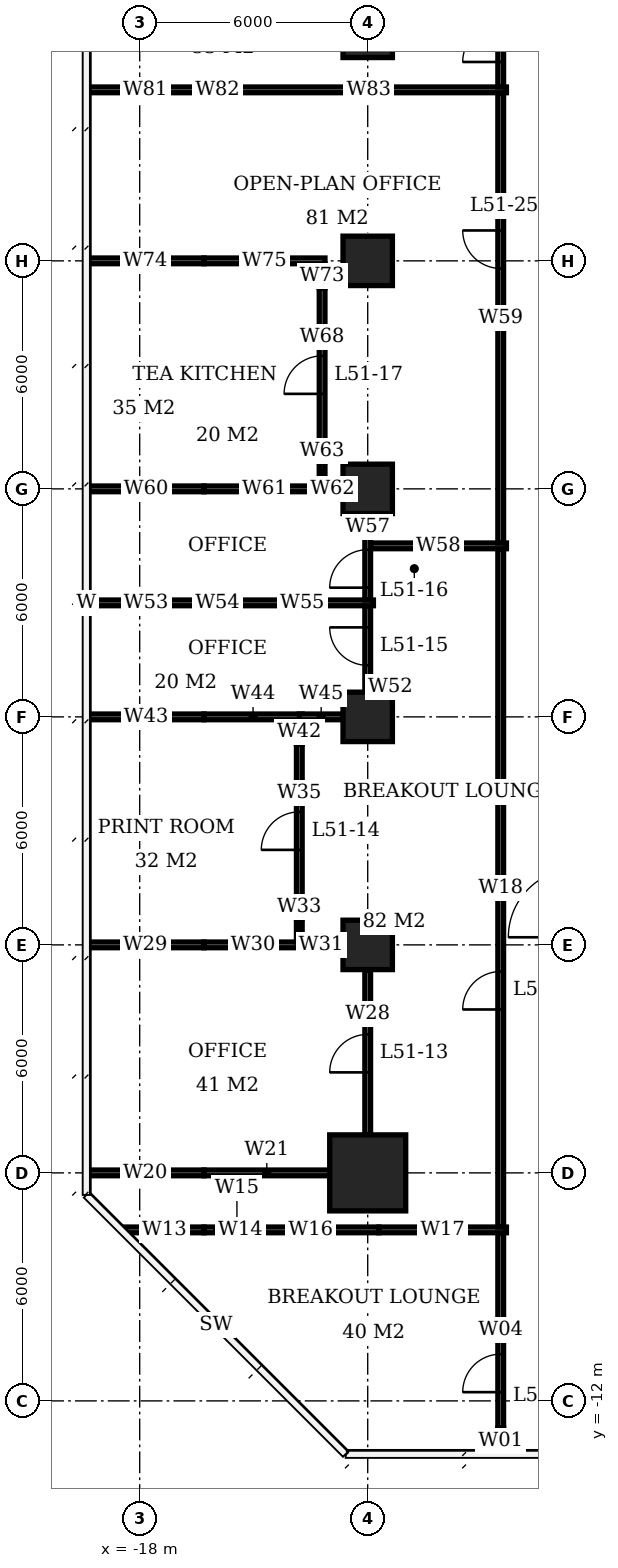
"""IFC4 building model, lengths in metres.
Left out: names, types, materials, properties, quantities, classifications, styles, units other than length and angle.
Written with IfcOpenShell. Run it as: python <this file> out.ifc"""

import sys

from ifc_helpers import new_model, si_unit, direction, frame, frame_2d, origin, origin_2d, place, context, subcontext, project, spatial, rectangle, extrude, element, fill, save


model = new_model("IFC4")
c1 = context("Model", 3, precision=1e-05, world=origin(), true_north=direction((0.0, 1.0)))
c2 = subcontext(c1, "Body", "Model", "MODEL_VIEW")
j1 = project(units=[si_unit("LENGTHUNIT", "METRE"), si_unit("PLANEANGLEUNIT", "RADIAN")], contexts=[c1])
p1 = place(None, origin())
s1 = spatial("IfcSite", under=j1, at=p1, CompositionType="ELEMENT")
p2 = place(p1, origin())
s2 = spatial("IfcBuilding", under=s1, at=p2, CompositionType="ELEMENT")
p3 = place(p2, frame((0.0, 0.0, 208.4)))
s3 = spatial("IfcBuildingStorey", under=s2, at=p3, CompositionType="ELEMENT", Elevation=208.4)
p4 = place(p3, frame((-12.0, -6.0, 0.0), z_axis=(0.0, 0.0, 1.0), x_axis=(1.0, 0.0, 0.0)))
e1 = element("IfcColumn", 1, at=p4, inside=s3, PredefinedType="COLUMN", context=c2, shape_type="SweptSolid", body=[
    extrude(rectangle(XDim=2.0, YDim=2.0, at=origin_2d()), origin(), (0.0, 0.0, 1.0), 3.9),
])
for number, where, z_axis, x_axis in (
    (2, (-12.0, 0.0, 0.0), (0.0, 0.0, 1.0), (1.0, 0.0, 0.0)),
    (3, (-12.0, 6.0, 0.0), (0.0, 0.0, 1.0), (1.0, 0.0, 0.0)),
    (4, (-12.0, 12.0, 0.0), (0.0, 0.0, 1.0), (1.0, 0.0, 0.0)),
    (5, (-12.0, 18.0, 0.0), (0.0, 0.0, 1.0), (1.0, 0.0, 0.0)),
    (6, (-12.0, 24.0, 0.0), (0.0, 0.0, 1.0), (1.0, 0.0, 0.0)),
):
    element("IfcColumn", number, at=place(p3, frame(where, z_axis=z_axis, x_axis=x_axis)), inside=s3, PredefinedType="COLUMN", context=c2, shape_type="SweptSolid", body=[
        extrude(rectangle(XDim=1.3, YDim=1.3, at=origin_2d()), origin(), (0.0, 0.0, 1.0), 3.9),
    ])
p5 = place(p3, frame((-19.4, -6.0, 0.0), z_axis=(0.0, 0.0, 1.0), x_axis=(1.0, 0.0, 0.0)))
e7 = element("IfcWall", 7, at=p5, inside=s3, PredefinedType="PARTITIONING", context=c2, shape_type="SweptSolid", body=[
    extrude(rectangle(XDim=3.09, YDim=0.15, at=frame_2d((1.545, 0.0))), origin(), (0.0, 0.0, 1.0), 3.65),
])
p6 = place(p3, frame((-16.31, -6.0, 0.0), z_axis=(0.0, 0.0, 1.0), x_axis=(1.0, 0.0, 0.0)))
e8 = element("IfcWall", 8, at=p6, inside=s3, PredefinedType="PARTITIONING", context=c2, shape_type="SweptSolid", body=[
    extrude(rectangle(XDim=3.31, YDim=0.15, at=frame_2d((1.655, 0.0))), origin(), (0.0, 0.0, 1.0), 2.65),
])
p7 = place(p3, frame((-19.4, 0.0, 0.0), z_axis=(0.0, 0.0, 1.0), x_axis=(1.0, 0.0, 0.0)))
e9 = element("IfcWall", 9, at=p7, inside=s3, PredefinedType="PARTITIONING", context=c2, shape_type="SweptSolid", body=[
    extrude(rectangle(XDim=3.09, YDim=0.15, at=frame_2d((1.545, 0.0))), origin(), (0.0, 0.0, 1.0), 3.65),
])
p8 = place(p3, frame((-16.31, 0.0, 0.0), z_axis=(0.0, 0.0, 1.0), x_axis=(1.0, 0.0, 0.0)))
e10 = element("IfcWall", 10, at=p8, inside=s3, PredefinedType="PARTITIONING", context=c2, shape_type="SweptSolid", body=[
    extrude(rectangle(XDim=2.585, YDim=0.15, at=frame_2d((1.292, 0.0))), origin(), (0.0, 0.0, 1.0), 2.65),
])
p9 = place(p3, frame((-13.8, 0.0, 0.0), z_axis=(0.0, 0.0, 1.0), x_axis=(1.0, 0.0, 0.0)))
e11 = element("IfcWall", 11, at=p9, inside=s3, PredefinedType="PARTITIONING", context=c2, shape_type="SweptSolid", body=[
    extrude(rectangle(XDim=1.15, YDim=0.15, at=frame_2d((0.575, 0.0))), origin(), (0.0, 0.0, 1.0), 2.65),
])
p10 = place(p3, frame((-19.35, 6.0, 0.0), z_axis=(0.0, 0.0, 1.0), x_axis=(1.0, 0.0, 0.0)))
e12 = element("IfcWall", 12, at=p10, inside=s3, PredefinedType="PARTITIONING", context=c2, shape_type="SweptSolid", body=[
    extrude(rectangle(XDim=3.04, YDim=0.15, at=frame_2d((1.52, 0.0))), origin(), (0.0, 0.0, 1.0), 3.65),
])
p11 = place(p3, frame((-16.31, 6.0, 0.0), z_axis=(0.0, 0.0, 1.0), x_axis=(1.0, 0.0, 0.0)))
e13 = element("IfcWall", 13, at=p11, inside=s3, PredefinedType="PARTITIONING", context=c2, shape_type="SweptSolid", body=[
    extrude(rectangle(XDim=2.585, YDim=0.15, at=frame_2d((1.292, 0.0))), origin(), (0.0, 0.0, 1.0), 2.65),
])
p12 = place(p3, frame((-13.8, 6.0, 0.0), z_axis=(0.0, 0.0, 1.0), x_axis=(1.0, 0.0, 0.0)))
e14 = element("IfcWall", 14, at=p12, inside=s3, PredefinedType="PARTITIONING", context=c2, shape_type="SweptSolid", body=[
    extrude(rectangle(XDim=1.15, YDim=0.15, at=frame_2d((0.575, 0.0))), origin(), (0.0, 0.0, 1.0), 2.65),
])
p13 = place(p3, frame((-19.35, 9.0, 0.0), z_axis=(0.0, 0.0, 1.0), x_axis=(1.0, 0.0, 0.0)))
e15 = element("IfcWall", 15, at=p13, inside=s3, PredefinedType="PARTITIONING", context=c2, shape_type="SweptSolid", body=[
    extrude(rectangle(XDim=3.04, YDim=0.15, at=frame_2d((1.52, 0.0))), origin(), (0.0, 0.0, 1.0), 3.65),
])
p14 = place(p3, frame((-16.31, 9.0, 0.0), z_axis=(0.0, 0.0, 1.0), x_axis=(1.0, 0.0, 0.0)))
e16 = element("IfcWall", 16, at=p14, inside=s3, PredefinedType="PARTITIONING", context=c2, shape_type="SweptSolid", body=[
    extrude(rectangle(XDim=0.72, YDim=0.15, at=frame_2d((0.36, 0.0))), origin(), (0.0, 0.0, 1.0), 2.65),
])
p15 = place(p3, frame((-15.59, 9.0, 0.0), z_axis=(0.0, 0.0, 1.0), x_axis=(1.0, 0.0, 0.0)))
e17 = element("IfcWall", 17, at=p15, inside=s3, PredefinedType="PARTITIONING", context=c2, shape_type="SweptSolid", body=[
    extrude(rectangle(XDim=3.74, YDim=0.15, at=frame_2d((1.87, 0.0))), origin(), (0.0, 0.0, 1.0), 3.65),
])
p16 = place(p3, frame((-19.35, 12.0, 0.0), z_axis=(0.0, 0.0, 1.0), x_axis=(1.0, 0.0, 0.0)))
e18 = element("IfcWall", 18, at=p16, inside=s3, PredefinedType="PARTITIONING", context=c2, shape_type="SweptSolid", body=[
    extrude(rectangle(XDim=3.04, YDim=0.15, at=frame_2d((1.52, 0.0))), origin(), (0.0, 0.0, 1.0), 3.65),
])
p17 = place(p3, frame((-16.31, 12.0, 0.0), z_axis=(0.0, 0.0, 1.0), x_axis=(1.0, 0.0, 0.0)))
e19 = element("IfcWall", 19, at=p17, inside=s3, PredefinedType="PARTITIONING", context=c2, shape_type="SweptSolid", body=[
    extrude(rectangle(XDim=3.185, YDim=0.15, at=frame_2d((1.593, 0.0))), origin(), (0.0, 0.0, 1.0), 2.65),
])
p18 = place(p3, frame((-13.2, 12.0, 0.0), z_axis=(0.0, 0.0, 1.0), x_axis=(1.0, 0.0, 0.0)))
e20 = element("IfcWall", 20, at=p18, inside=s3, PredefinedType="PARTITIONING", context=c2, shape_type="SweptSolid", body=[
    extrude(rectangle(XDim=0.55, YDim=0.15, at=frame_2d((0.275, 0.0))), origin(), (0.0, 0.0, 1.0), 2.65),
])
p19 = place(p3, frame((-19.4, 18.0, 0.0), z_axis=(0.0, 0.0, 1.0), x_axis=(1.0, 0.0, 0.0)))
e21 = element("IfcWall", 21, at=p19, inside=s3, PredefinedType="PARTITIONING", context=c2, shape_type="SweptSolid", body=[
    extrude(rectangle(XDim=3.09, YDim=0.15, at=frame_2d((1.545, 0.0))), origin(), (0.0, 0.0, 1.0), 3.65),
])
p20 = place(p3, frame((-16.31, 18.0, 0.0), z_axis=(0.0, 0.0, 1.0), x_axis=(1.0, 0.0, 0.0)))
e22 = element("IfcWall", 22, at=p20, inside=s3, PredefinedType="PARTITIONING", context=c2, shape_type="SweptSolid", body=[
    extrude(rectangle(XDim=3.185, YDim=0.15, at=frame_2d((1.593, 0.0))), origin(), (0.0, 0.0, 1.0), 2.65),
])
p21 = place(p3, frame((-13.8, 0.075, 0.0), z_axis=(0.0, 0.0, 1.0), x_axis=(0.0, 1.0, 0.0)))
e23 = element("IfcWall", 23, at=p21, inside=s3, PredefinedType="PARTITIONING", context=c2, shape_type="SweptSolid", body=[
    extrude(rectangle(XDim=0.635, YDim=0.15, at=frame_2d((0.317, 0.0))), origin(), (0.0, 0.0, 1.0), 2.65),
])
p22 = place(p3, frame((-13.8, 0.71, 0.0), z_axis=(0.0, 0.0, 1.0), x_axis=(0.0, 1.0, 0.0)))
e24 = element("IfcWall", 24, at=p22, inside=s3, PredefinedType="PARTITIONING", context=c2, shape_type="SweptSolid", body=[
    extrude(rectangle(XDim=4.58, YDim=0.15, at=frame_2d((2.29, 0.0))), origin(), (0.0, 0.0, 1.0), 3.65),
])
p23 = place(p22, frame((1.79, 0.0, 0.0)))
e25 = element("IfcOpeningElement", 25, at=p23, cuts=e24, PredefinedType="OPENING", context=c2, shape_type="SweptSolid", body=[
    extrude(rectangle(XDim=1.0, YDim=2.1, at=frame_2d((0.5, 1.05))), frame((0.0, 0.085, 0.0), z_axis=(0.0, -1.0, 0.0), x_axis=(1.0, 0.0, 0.0)), (0.0, 0.0, 1.0), 0.17),
])
for number, where, z_axis, x_axis in (
    (26, (-13.8, 5.29, 0.0), (0.0, 0.0, 1.0), (0.0, 1.0, 0.0)),
    (27, (-13.2, 12.075, 0.0), (0.0, 0.0, 1.0), (0.0, 1.0, 0.0)),
):
    element("IfcWall", number, at=place(p3, frame(where, z_axis=z_axis, x_axis=x_axis)), inside=s3, PredefinedType="PARTITIONING", context=c2, shape_type="SweptSolid", body=[
        extrude(rectangle(XDim=0.635, YDim=0.15, at=frame_2d((0.317, 0.0))), origin(), (0.0, 0.0, 1.0), 2.65),
    ])
p24 = place(p3, frame((-13.2, 12.71, 0.0), z_axis=(0.0, 0.0, 1.0), x_axis=(0.0, 1.0, 0.0)))
e28 = element("IfcWall", 28, at=p24, inside=s3, PredefinedType="PARTITIONING", context=c2, shape_type="SweptSolid", body=[
    extrude(rectangle(XDim=4.58, YDim=0.15, at=frame_2d((2.29, 0.0))), origin(), (0.0, 0.0, 1.0), 3.65),
])
p25 = place(p24, frame((1.79, 0.0, 0.0)))
e29 = element("IfcOpeningElement", 29, at=p25, cuts=e28, PredefinedType="OPENING", context=c2, shape_type="SweptSolid", body=[
    extrude(rectangle(XDim=1.0, YDim=2.1, at=frame_2d((0.5, 1.05))), frame((0.0, 0.085, 0.0), z_axis=(0.0, -1.0, 0.0), x_axis=(1.0, 0.0, 0.0)), (0.0, 0.0, 1.0), 0.17),
])
p26 = place(p3, frame((-13.2, 17.29, 0.0), z_axis=(0.0, 0.0, 1.0), x_axis=(0.0, 1.0, 0.0)))
e30 = element("IfcWall", 30, at=p26, inside=s3, PredefinedType="PARTITIONING", context=c2, shape_type="SweptSolid", body=[
    extrude(rectangle(XDim=0.635, YDim=0.15, at=frame_2d((0.317, 0.0))), origin(), (0.0, 0.0, 1.0), 2.65),
])
p27 = place(p3, frame((-12.0, -5.0, 0.0), z_axis=(0.0, 0.0, 1.0), x_axis=(0.0, 1.0, 0.0)))
e31 = element("IfcWall", 31, at=p27, inside=s3, PredefinedType="PARTITIONING", context=c2, shape_type="SweptSolid", body=[
    extrude(rectangle(XDim=4.34, YDim=0.15, at=frame_2d((2.17, 0.0))), origin(), (0.0, 0.0, 1.0), 3.65),
])
p28 = place(p27, frame((1.645, 0.0, 0.0)))
e32 = element("IfcOpeningElement", 32, at=p28, cuts=e31, PredefinedType="OPENING", context=c2, shape_type="SweptSolid", body=[
    extrude(rectangle(XDim=1.0, YDim=2.1, at=frame_2d((0.5, 1.05))), frame((0.0, 0.085, 0.0), z_axis=(0.0, -1.0, 0.0), x_axis=(1.0, 0.0, 0.0)), (0.0, 0.0, 1.0), 0.17),
])
p29 = place(p3, frame((-12.0, 6.66, 0.0), z_axis=(0.0, 0.0, 1.0), x_axis=(0.0, 1.0, 0.0)))
e33 = element("IfcWall", 33, at=p29, inside=s3, PredefinedType="PARTITIONING", context=c2, shape_type="SweptSolid", body=[
    extrude(rectangle(XDim=2.265, YDim=0.15, at=frame_2d((1.133, 0.0))), origin(), (0.0, 0.0, 1.0), 3.65),
])
p30 = place(p29, frame((0.695, 0.0, 0.0)))
e34 = element("IfcOpeningElement", 34, at=p30, cuts=e33, PredefinedType="OPENING", context=c2, shape_type="SweptSolid", body=[
    extrude(rectangle(XDim=1.0, YDim=2.1, at=frame_2d((0.5, 1.05))), frame((0.0, 0.085, 0.0), z_axis=(0.0, -1.0, 0.0), x_axis=(1.0, 0.0, 0.0)), (0.0, 0.0, 1.0), 0.17),
])
p31 = place(p3, frame((-12.0, 9.075, 0.0), z_axis=(0.0, 0.0, 1.0), x_axis=(0.0, 1.0, 0.0)))
e35 = element("IfcWall", 35, at=p31, inside=s3, PredefinedType="PARTITIONING", context=c2, shape_type="SweptSolid", body=[
    extrude(rectangle(XDim=2.265, YDim=0.15, at=frame_2d((1.133, 0.0))), origin(), (0.0, 0.0, 1.0), 3.65),
])
p32 = place(p31, frame((0.325, 0.0, 0.0)))
e36 = element("IfcOpeningElement", 36, at=p32, cuts=e35, PredefinedType="OPENING", context=c2, shape_type="SweptSolid", body=[
    extrude(rectangle(XDim=1.0, YDim=2.1, at=frame_2d((0.5, 1.05))), frame((0.0, 0.085, 0.0), z_axis=(0.0, -1.0, 0.0), x_axis=(1.0, 0.0, 0.0)), (0.0, 0.0, 1.0), 0.17),
])
p33 = place(p3, frame((-19.4, 22.5, 0.0), z_axis=(0.0, 0.0, 1.0), x_axis=(1.0, 0.0, 0.0)))
e37 = element("IfcWall", 37, at=p33, inside=s3, PredefinedType="PARTITIONING", context=c2, shape_type="SweptSolid", body=[
    extrude(rectangle(XDim=3.09, YDim=0.15, at=frame_2d((1.545, 0.0))), origin(), (0.0, 0.0, 1.0), 3.65),
])
p34 = place(p3, frame((-16.31, 22.5, 0.0), z_axis=(0.0, 0.0, 1.0), x_axis=(1.0, 0.0, 0.0)))
e38 = element("IfcWall", 38, at=p34, inside=s3, PredefinedType="PARTITIONING", context=c2, shape_type="SweptSolid", body=[
    extrude(rectangle(XDim=0.72, YDim=0.15, at=frame_2d((0.36, 0.0))), origin(), (0.0, 0.0, 1.0), 2.65),
])
p35 = place(p3, frame((-15.59, 22.5, 0.0), z_axis=(0.0, 0.0, 1.0), x_axis=(1.0, 0.0, 0.0)))
e39 = element("IfcWall", 39, at=p35, inside=s3, PredefinedType="PARTITIONING", context=c2, shape_type="SweptSolid", body=[
    extrude(rectangle(XDim=7.24, YDim=0.15, at=frame_2d((3.62, 0.0))), origin(), (0.0, 0.0, 1.0), 3.65),
])
p36 = place(p3, frame((-18.388, -7.5, 0.0), z_axis=(0.0, 0.0, 1.0), x_axis=(1.0, 0.0, 0.0)))
e40 = element("IfcWall", 40, at=p36, inside=s3, PredefinedType="PARTITIONING", context=c2, shape_type="SweptSolid", body=[
    extrude(rectangle(XDim=2.078, YDim=0.15, at=frame_2d((1.039, 0.0))), origin(), (0.0, 0.0, 1.0), 3.65),
])
p37 = place(p3, frame((-16.31, -7.5, 0.0), z_axis=(0.0, 0.0, 1.0), x_axis=(1.0, 0.0, 0.0)))
e41 = element("IfcWall", 41, at=p37, inside=s3, PredefinedType="PARTITIONING", context=c2, shape_type="SweptSolid", body=[
    extrude(rectangle(XDim=0.72, YDim=0.15, at=frame_2d((0.36, 0.0))), origin(), (0.0, 0.0, 1.0), 2.65),
])
p38 = place(p3, frame((-15.59, -7.5, 0.0), z_axis=(0.0, 0.0, 1.0), x_axis=(1.0, 0.0, 0.0)))
e42 = element("IfcWall", 42, at=p38, inside=s3, PredefinedType="PARTITIONING", context=c2, shape_type="SweptSolid", body=[
    extrude(rectangle(XDim=0.298, YDim=0.15, at=frame_2d((0.149, 0.0))), origin(), (0.0, 0.0, 1.0), 3.65),
])
p39 = place(p3, frame((-15.292, -7.5, 0.0), z_axis=(0.0, 0.0, 1.0), x_axis=(1.0, 0.0, 0.0)))
e43 = element("IfcWall", 43, at=p39, inside=s3, PredefinedType="PARTITIONING", context=c2, shape_type="SweptSolid", body=[
    extrude(rectangle(XDim=3.584, YDim=0.15, at=frame_2d((1.792, 0.0))), origin(), (0.0, 0.0, 1.0), 2.65),
])
p40 = place(p3, frame((-11.708, -7.5, 0.0), z_axis=(0.0, 0.0, 1.0), x_axis=(1.0, 0.0, 0.0)))
e44 = element("IfcWall", 44, at=p40, inside=s3, PredefinedType="PARTITIONING", context=c2, shape_type="SweptSolid", body=[
    extrude(rectangle(XDim=3.358, YDim=0.15, at=frame_2d((1.679, 0.0))), origin(), (0.0, 0.0, 1.0), 3.65),
])
p41 = place(p3, frame((-11.925, 10.5, 0.0), z_axis=(0.0, 0.0, 1.0), x_axis=(1.0, 0.0, 0.0)))
e45 = element("IfcWall", 45, at=p41, inside=s3, PredefinedType="PARTITIONING", context=c2, shape_type="SweptSolid", body=[
    extrude(rectangle(XDim=3.575, YDim=0.15, at=frame_2d((1.788, 0.0))), origin(), (0.0, 0.0, 1.0), 3.65),
])
p42 = place(p3, frame((-8.5, -13.4, 0.0), z_axis=(0.0, 0.0, 1.0), x_axis=(0.0, 1.0, 0.0)))
e46 = element("IfcWall", 46, at=p42, inside=s3, PredefinedType="PARTITIONING", context=c2, shape_type="SweptSolid", body=[
    extrude(rectangle(XDim=0.692, YDim=0.15, at=frame_2d((0.346, 0.0))), origin(), (0.0, 0.0, 1.0), 2.65),
])
p43 = place(p3, frame((-8.5, -12.708, 0.0), z_axis=(0.0, 0.0, 1.0), x_axis=(0.0, 1.0, 0.0)))
e47 = element("IfcWall", 47, at=p43, inside=s3, PredefinedType="PARTITIONING", context=c2, shape_type="SweptSolid", body=[
    extrude(rectangle(XDim=5.133, YDim=0.15, at=frame_2d((2.566, 0.0))), origin(), (0.0, 0.0, 1.0), 3.65),
])
p44 = place(p43, frame((0.938, 0.0, 0.0)))
e48 = element("IfcOpeningElement", 48, at=p44, cuts=e47, PredefinedType="OPENING", context=c2, shape_type="SweptSolid", body=[
    extrude(rectangle(XDim=1.0, YDim=2.1, at=frame_2d((0.5, 1.05))), frame((0.0, 0.085, 0.0), z_axis=(0.0, -1.0, 0.0), x_axis=(1.0, 0.0, 0.0)), (0.0, 0.0, 1.0), 0.17),
])
p45 = place(p3, frame((-8.5, -7.425, 0.0), z_axis=(0.0, 0.0, 1.0), x_axis=(0.0, 1.0, 0.0)))
e49 = element("IfcWall", 49, at=p45, inside=s3, PredefinedType="PARTITIONING", context=c2, shape_type="SweptSolid", body=[
    extrude(rectangle(XDim=17.85, YDim=0.15, at=frame_2d((8.925, 0.0))), origin(), (0.0, 0.0, 1.0), 3.65),
])
p46 = place(p45, frame((5.725, 0.0, 0.0)))
e50 = element("IfcOpeningElement", 50, at=p46, cuts=e49, PredefinedType="OPENING", context=c2, shape_type="SweptSolid", body=[
    extrude(rectangle(XDim=1.0, YDim=2.1, at=frame_2d((0.5, 1.05))), frame((0.0, 0.085, 0.0), z_axis=(0.0, -1.0, 0.0), x_axis=(1.0, 0.0, 0.0)), (0.0, 0.0, 1.0), 0.17),
])
p47 = place(p3, frame((-8.5, 10.575, 0.0), z_axis=(0.0, 0.0, 1.0), x_axis=(0.0, 1.0, 0.0)))
e51 = element("IfcWall", 51, at=p47, inside=s3, PredefinedType="PARTITIONING", context=c2, shape_type="SweptSolid", body=[
    extrude(rectangle(XDim=11.85, YDim=0.15, at=frame_2d((5.925, 0.0))), origin(), (0.0, 0.0, 1.0), 3.65),
])
p48 = place(p47, frame((7.225, 0.0, 0.0)))
e52 = element("IfcOpeningElement", 52, at=p48, cuts=e51, PredefinedType="OPENING", context=c2, shape_type="SweptSolid", body=[
    extrude(rectangle(XDim=1.0, YDim=2.1, at=frame_2d((0.5, 1.05))), frame((0.0, 0.085, 0.0), z_axis=(0.0, -1.0, 0.0), x_axis=(1.0, 0.0, 0.0)), (0.0, 0.0, 1.0), 0.17),
])
p49 = place(p3, frame((-8.5, 22.575, 0.0), z_axis=(0.0, 0.0, 1.0), x_axis=(0.0, 1.0, 0.0)))
e53 = element("IfcWall", 53, at=p49, inside=s3, PredefinedType="PARTITIONING", context=c2, shape_type="SweptSolid", body=[
    extrude(rectangle(XDim=3.45, YDim=0.15, at=frame_2d((1.725, 0.0))), origin(), (0.0, 0.0, 1.0), 3.65),
])
p50 = place(p49, frame((0.659, 0.0, 0.0)))
e54 = element("IfcOpeningElement", 54, at=p50, cuts=e53, PredefinedType="OPENING", context=c2, shape_type="SweptSolid", body=[
    extrude(rectangle(XDim=1.0, YDim=2.1, at=frame_2d((0.5, 1.05))), frame((0.0, 0.085, 0.0), z_axis=(0.0, -1.0, 0.0), x_axis=(1.0, 0.0, 0.0)), (0.0, 0.0, 1.0), 0.17),
])
p51 = place(p28, origin())
e55 = element("IfcDoor", 55, at=p51, inside=s3, OperationType="SINGLE_SWING_LEFT", PredefinedType="DOOR", context=c2, shape_type="SweptSolid", body=[
    extrude(rectangle(XDim=1.0, YDim=2.1, at=frame_2d((0.5, 1.05))), frame((0.0, 0.025, 0.0), z_axis=(0.0, -1.0, 0.0), x_axis=(1.0, 0.0, 0.0)), (0.0, 0.0, 1.0), 0.05),
])
fill(e32, e55)
p52 = place(p23, origin())
e56 = element("IfcDoor", 56, at=p52, inside=s3, OperationType="SINGLE_SWING_LEFT", PredefinedType="DOOR", context=c2, shape_type="SweptSolid", body=[
    extrude(rectangle(XDim=1.0, YDim=2.1, at=frame_2d((0.5, 1.05))), frame((0.0, 0.025, 0.0), z_axis=(0.0, -1.0, 0.0), x_axis=(1.0, 0.0, 0.0)), (0.0, 0.0, 1.0), 0.05),
])
fill(e25, e56)
p53 = place(p30, origin())
e57 = element("IfcDoor", 57, at=p53, inside=s3, OperationType="SINGLE_SWING_RIGHT", PredefinedType="DOOR", context=c2, shape_type="SweptSolid", body=[
    extrude(rectangle(XDim=1.0, YDim=2.1, at=frame_2d((0.5, 1.05))), frame((0.0, 0.025, 0.0), z_axis=(0.0, -1.0, 0.0), x_axis=(1.0, 0.0, 0.0)), (0.0, 0.0, 1.0), 0.05),
])
fill(e34, e57)
p54 = place(p32, origin())
e58 = element("IfcDoor", 58, at=p54, inside=s3, OperationType="SINGLE_SWING_LEFT", PredefinedType="DOOR", context=c2, shape_type="SweptSolid", body=[
    extrude(rectangle(XDim=1.0, YDim=2.1, at=frame_2d((0.5, 1.05))), frame((0.0, 0.025, 0.0), z_axis=(0.0, -1.0, 0.0), x_axis=(1.0, 0.0, 0.0)), (0.0, 0.0, 1.0), 0.05),
])
fill(e36, e58)
p55 = place(p25, origin())
e59 = element("IfcDoor", 59, at=p55, inside=s3, OperationType="SINGLE_SWING_LEFT", PredefinedType="DOOR", context=c2, shape_type="SweptSolid", body=[
    extrude(rectangle(XDim=1.0, YDim=2.1, at=frame_2d((0.5, 1.05))), frame((0.0, 0.025, 0.0), z_axis=(0.0, -1.0, 0.0), x_axis=(1.0, 0.0, 0.0)), (0.0, 0.0, 1.0), 0.05),
])
fill(e29, e59)
p56 = place(p44, origin())
e60 = element("IfcDoor", 60, at=p56, inside=s3, OperationType="SINGLE_SWING_LEFT", PredefinedType="DOOR", context=c2, shape_type="SweptSolid", body=[
    extrude(rectangle(XDim=1.0, YDim=2.1, at=frame_2d((0.5, 1.05))), frame((0.0, 0.025, 0.0), z_axis=(0.0, -1.0, 0.0), x_axis=(1.0, 0.0, 0.0)), (0.0, 0.0, 1.0), 0.05),
])
fill(e48, e60)
p57 = place(p46, origin())
e61 = element("IfcDoor", 61, at=p57, inside=s3, OperationType="SINGLE_SWING_LEFT", PredefinedType="DOOR", context=c2, shape_type="SweptSolid", body=[
    extrude(rectangle(XDim=1.0, YDim=2.1, at=frame_2d((0.5, 1.05))), frame((0.0, 0.025, 0.0), z_axis=(0.0, -1.0, 0.0), x_axis=(1.0, 0.0, 0.0)), (0.0, 0.0, 1.0), 0.05),
])
fill(e50, e61)
p58 = place(p48, origin())
e62 = element("IfcDoor", 62, at=p58, inside=s3, OperationType="SINGLE_SWING_RIGHT", PredefinedType="DOOR", context=c2, shape_type="SweptSolid", body=[
    extrude(rectangle(XDim=1.0, YDim=2.1, at=frame_2d((0.5, 1.05))), frame((0.0, 0.025, 0.0), z_axis=(0.0, -1.0, 0.0), x_axis=(1.0, 0.0, 0.0)), (0.0, 0.0, 1.0), 0.05),
])
fill(e52, e62)
p59 = place(p50, origin())
e63 = element("IfcDoor", 63, at=p59, inside=s3, OperationType="SINGLE_SWING_LEFT", PredefinedType="DOOR", context=c2, shape_type="SweptSolid", body=[
    extrude(rectangle(XDim=1.0, YDim=2.1, at=frame_2d((0.5, 1.05))), frame((0.0, 0.025, 0.0), z_axis=(0.0, -1.0, 0.0), x_axis=(1.0, 0.0, 0.0)), (0.0, 0.0, 1.0), 0.05),
])
fill(e54, e63)
save(model, sys.argv[1])
